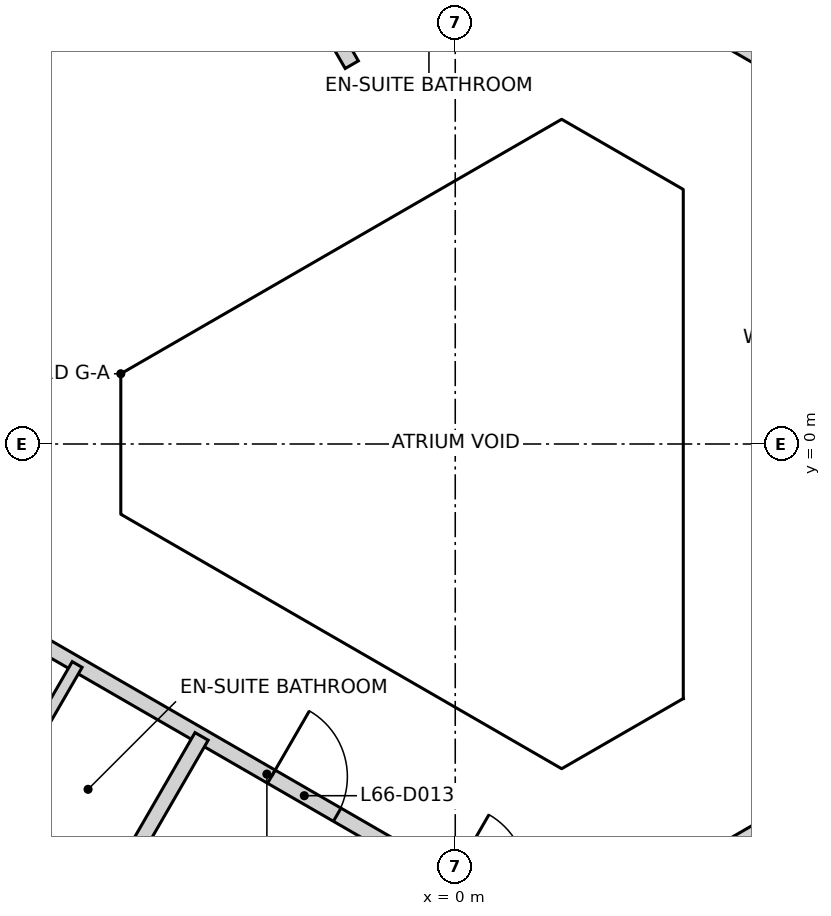
"""IFC4 building model, lengths in metres.
Left out: names, types, materials, properties, quantities, classifications, styles, units other than length and angle.
Written with IfcOpenShell. Run it as: python <this file> out.ifc"""

import sys

from ifc_helpers import new_model, si_unit, direction, frame, frame_2d, origin, origin_2d, place, context, subcontext, project, spatial, rectangle, extrude, element, fill, save


model = new_model("IFC4")
c1 = context("Model", 3, precision=1e-05, world=origin(), true_north=direction((0.0, 1.0)))
c2 = subcontext(c1, "Body", "Model", "MODEL_VIEW")
j1 = project(units=[si_unit("LENGTHUNIT", "METRE"), si_unit("PLANEANGLEUNIT", "RADIAN")], contexts=[c1])
p1 = place(None, origin())
s1 = spatial("IfcSite", under=j1, at=p1, CompositionType="ELEMENT")
p2 = place(p1, origin())
s2 = spatial("IfcBuilding", under=s1, at=p2, CompositionType="ELEMENT")
p3 = place(p2, frame((0.0, 0.0, 262.2)))
s3 = spatial("IfcBuildingStorey", under=s2, at=p3, CompositionType="ELEMENT", Elevation=262.2)
p4 = place(p3, frame((-6.356, -2.103, 0.0), z_axis=(0.0, 0.0, 1.0), x_axis=(0.865939059902, -0.50014952218, 0.0)))
e1 = element("IfcWall", 1, at=p4, inside=s3, PredefinedType="PARTITIONING", context=c2, shape_type="SweptSolid", body=[
    extrude(rectangle(XDim=8.956, YDim=0.2, at=frame_2d((4.478, 0.0))), origin(), (0.0, 0.0, 1.0), 3.25),
])
p5 = place(p4, frame((4.546, 0.0, 0.0)))
e2 = element("IfcOpeningElement", 2, at=p5, cuts=e1, PredefinedType="OPENING", context=c2, shape_type="SweptSolid", body=[
    extrude(rectangle(XDim=1.0, YDim=2.1, at=frame_2d((0.5, 1.05))), frame((0.0, 0.11, 0.0), z_axis=(0.0, -1.0, 0.0), x_axis=(1.0, 0.0, 0.0)), (0.0, 0.0, 1.0), 0.22),
])
p6 = place(p4, frame((7.275, 0.0, 0.0)))
e3 = element("IfcOpeningElement", 3, at=p6, cuts=e1, PredefinedType="OPENING", context=c2, shape_type="SweptSolid", body=[
    extrude(rectangle(XDim=1.0, YDim=2.1, at=frame_2d((0.5, 1.05))), frame((0.0, 0.11, 0.0), z_axis=(0.0, -1.0, 0.0), x_axis=(1.0, 0.0, 0.0)), (0.0, 0.0, 1.0), 0.22),
])
p7 = place(p3, frame((1.401, -6.583, 0.0), z_axis=(0.0, 0.0, 1.0), x_axis=(0.865818713766, 0.500357826853, 0.0)))
e4 = element("IfcWall", 4, at=p7, inside=s3, PredefinedType="PARTITIONING", context=c2, shape_type="SweptSolid", body=[
    extrude(rectangle(XDim=4.157, YDim=0.2, at=frame_2d((2.079, 0.0))), origin(), (0.0, 0.0, 1.0), 3.25),
])
p8 = place(p3, frame((3.39, 5.433, 0.0), z_axis=(0.0, 0.0, 1.0), x_axis=(0.866117799835, -0.499839931186, 0.0)))
e5 = element("IfcWall", 5, at=p8, inside=s3, PredefinedType="PARTITIONING", context=c2, shape_type="SweptSolid", body=[
    extrude(rectangle(XDim=1.859, YDim=0.2, at=frame_2d((0.929, 0.0))), origin(), (0.0, 0.0, 1.0), 3.25),
])
p9 = place(p3, frame((-9.501, -14.524, 0.0), z_axis=(0.0, 0.0, 1.0), x_axis=(0.499964147476, 0.86604610226, 0.0)))
e6 = element("IfcWall", 6, at=p9, inside=s3, PredefinedType="PARTITIONING", context=c2, shape_type="SweptSolid", body=[
    extrude(rectangle(XDim=12.329, YDim=0.2, at=frame_2d((6.165, 0.0))), origin(), (0.0, 0.0, 1.0), 2.35),
])
p10 = place(p3, frame((-7.524, 15.666, 0.0), z_axis=(0.0, 0.0, 1.0), x_axis=(0.499979611936, -0.866037174519, 0.0)))
e7 = element("IfcWall", 7, at=p10, inside=s3, PredefinedType="PARTITIONING", context=c2, shape_type="SweptSolid", body=[
    extrude(rectangle(XDim=12.327, YDim=0.2, at=frame_2d((6.164, 0.0))), origin(), (0.0, 0.0, 1.0), 2.35),
])
p11 = place(p3, frame((-6.324, -5.237, 0.0), z_axis=(0.0, 0.0, 1.0), x_axis=(0.500294180644, 0.865855491877, 0.0)))
e8 = element("IfcWall", 8, at=p11, inside=s3, PredefinedType="PARTITIONING", context=c2, shape_type="SweptSolid", body=[
    extrude(rectangle(XDim=2.698, YDim=0.15, at=frame_2d((1.349, 0.0))), origin(), (0.0, 0.0, 1.0), 3.25),
])
p12 = place(p11, frame((0.948, 0.0, 0.0)))
e9 = element("IfcOpeningElement", 9, at=p12, cuts=e8, PredefinedType="OPENING", context=c2, shape_type="SweptSolid", body=[
    extrude(rectangle(XDim=0.8, YDim=2.1, at=frame_2d((0.4, 1.05))), frame((0.0, 0.085, 0.0), z_axis=(0.0, -1.0, 0.0), x_axis=(1.0, 0.0, 0.0)), (0.0, 0.0, 1.0), 0.17),
])
p13 = place(p3, frame((0.0, 0.0, -0.35)))
p14 = place(p13, origin())
p15 = place(p14, frame((0.0, 0.0, 0.3)))
e10 = element("IfcWindow", 10, at=p15, inside=s3, PartitioningType="SINGLE_PANEL", PredefinedType="SKYLIGHT", context=c2, shape_type="SweptSolid", body=[
    extrude(rectangle(XDim=4.88, YDim=3.04, at=origin_2d()), origin(), (0.0, 0.0, 1.0), 0.05),
])
p16 = place(p5, frame((1.0, 0.0, 0.0), z_axis=(0.0, 0.0, 1.0), x_axis=(-1.0, 0.0, 0.0)))
e11 = element("IfcDoor", 11, at=p16, inside=s3, OperationType="SINGLE_SWING_LEFT", PredefinedType="DOOR", context=c2, shape_type="SweptSolid", body=[
    extrude(rectangle(XDim=1.0, YDim=2.1, at=frame_2d((0.5, 1.05))), frame((0.0, 0.025, 0.0), z_axis=(0.0, -1.0, 0.0), x_axis=(1.0, 0.0, 0.0)), (0.0, 0.0, 1.0), 0.05),
])
fill(e2, e11)
save(model, sys.argv[1])
